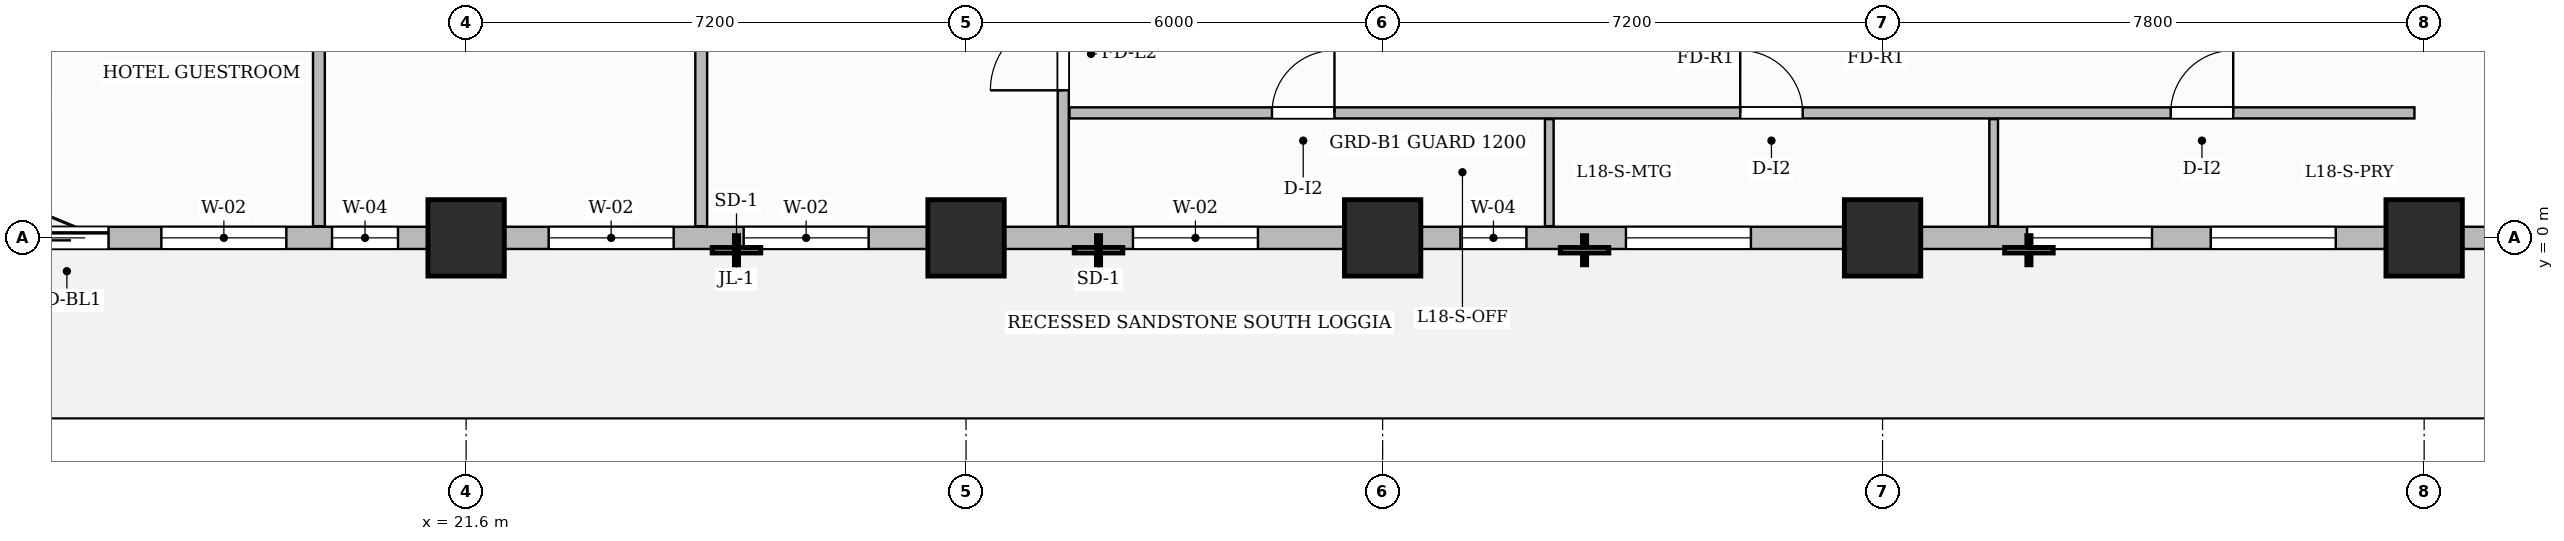
"""IFC4 building model, lengths in metres.
Left out: names, types, materials, properties, quantities, classifications, styles, units other than length and angle.
Written with IfcOpenShell. Run it as: python <this file> out.ifc"""

import sys

from ifc_helpers import new_model, si_unit, direction, frame, frame_2d, origin, origin_2d, place, context, subcontext, project, spatial, rectangle, extrude, source, transform, mapped, element, fill, save


model = new_model("IFC4")
c1 = context("Model", 3, precision=1e-05, world=origin(), true_north=direction((0.0, 1.0)))
c2 = subcontext(c1, "Body", "Model", "MODEL_VIEW")
j1 = project(units=[si_unit("LENGTHUNIT", "METRE"), si_unit("PLANEANGLEUNIT", "RADIAN")], contexts=[c1])
p1 = place(None, origin())
s1 = spatial("IfcSite", under=j1, at=p1, CompositionType="ELEMENT")
p2 = place(p1, origin())
s2 = spatial("IfcBuilding", under=s1, at=p2, CompositionType="ELEMENT")
p3 = place(p2, frame((0.0, 0.0, 76.8)))
s3 = spatial("IfcBuildingStorey", under=s2, at=p3, CompositionType="ELEMENT", Elevation=76.8)
m1 = source(origin(), c2, "Body", "SweptSolid", [
    extrude(rectangle(XDim=1.1, YDim=1.1, at=origin_2d()), origin(), (0.0, 0.0, 1.0), 3.7),
])
for number, where, z_axis, x_axis in (
    (1, (21.6, 0.0, 0.0), (0.0, 0.0, 1.0), (1.0, 0.0, 0.0)),
    (2, (28.8, 0.0, 0.0), (0.0, 0.0, 1.0), (1.0, 0.0, 0.0)),
    (3, (34.8, 0.0, 0.0), (0.0, 0.0, 1.0), (1.0, 0.0, 0.0)),
    (4, (42.0, 0.0, 0.0), (0.0, 0.0, 1.0), (1.0, 0.0, 0.0)),
    (5, (49.8, 0.0, 0.0), (0.0, 0.0, 1.0), (1.0, 0.0, 0.0)),
):
    element("IfcColumn", number, at=place(p3, frame(where, z_axis=z_axis, x_axis=x_axis)), inside=s3, PredefinedType="COLUMN", context=c2, shape_type="MappedRepresentation", body=[
        mapped(m1, transform((0.0, 0.0, 0.0), scale=1.0)),
    ])
p4 = place(p3, frame((30.2, 0.168, 0.0), z_axis=(0.0, 0.0, 1.0), x_axis=(0.0, 1.0, 0.0)))
e6 = element("IfcWall", 6, at=p4, inside=s3, PredefinedType="PARTITIONING", context=c2, shape_type="SweptSolid", body=[
    extrude(rectangle(XDim=9.092, YDim=0.16, at=frame_2d((4.546, 0.0))), origin(), (0.0, 0.0, 1.0), 3.45),
])
p5 = place(p4, frame((1.957, 0.0, 0.0)))
e7 = element("IfcOpeningElement", 7, at=p5, cuts=e6, PredefinedType="OPENING", context=c2, shape_type="SweptSolid", body=[
    extrude(rectangle(XDim=1.05, YDim=2.15, at=frame_2d((0.525, 1.075))), frame((0.0, 0.09, 0.0), z_axis=(0.0, -1.0, 0.0), x_axis=(1.0, 0.0, 0.0)), (0.0, 0.0, 1.0), 0.18),
])
p6 = place(p3, frame((30.29, 1.8, 0.0), z_axis=(0.0, 0.0, 1.0), x_axis=(1.0, 0.0, 0.0)))
e8 = element("IfcWall", 8, at=p6, inside=s3, PredefinedType="PARTITIONING", context=c2, shape_type="SweptSolid", body=[
    extrude(rectangle(XDim=19.37, YDim=0.16, at=frame_2d((9.685, 0.0))), origin(), (0.0, 0.0, 1.0), 3.45),
])
p7 = place(p6, frame((2.916, 0.0, 0.0)))
e9 = element("IfcOpeningElement", 9, at=p7, cuts=e8, PredefinedType="OPENING", context=c2, shape_type="SweptSolid", body=[
    extrude(rectangle(XDim=0.9, YDim=2.15, at=frame_2d((0.45, 1.075))), frame((0.0, 0.09, 0.0), z_axis=(0.0, -1.0, 0.0), x_axis=(1.0, 0.0, 0.0)), (0.0, 0.0, 1.0), 0.18),
])
p8 = place(p6, frame((9.66, 0.0, 0.0)))
e10 = element("IfcOpeningElement", 10, at=p8, cuts=e8, PredefinedType="OPENING", context=c2, shape_type="SweptSolid", body=[
    extrude(rectangle(XDim=0.9, YDim=2.15, at=frame_2d((0.45, 1.075))), frame((0.0, 0.09, 0.0), z_axis=(0.0, -1.0, 0.0), x_axis=(1.0, 0.0, 0.0)), (0.0, 0.0, 1.0), 0.18),
])
p9 = place(p6, frame((15.86, 0.0, 0.0)))
e11 = element("IfcOpeningElement", 11, at=p9, cuts=e8, PredefinedType="OPENING", context=c2, shape_type="SweptSolid", body=[
    extrude(rectangle(XDim=0.9, YDim=2.15, at=frame_2d((0.45, 1.075))), frame((0.0, 0.09, 0.0), z_axis=(0.0, -1.0, 0.0), x_axis=(1.0, 0.0, 0.0)), (0.0, 0.0, 1.0), 0.18),
])
for number, where, z_axis, x_axis in (
    (12, (37.2, 0.168, 0.0), (0.0, 0.0, 1.0), (0.0, 1.0, 0.0)),
    (13, (43.6, 0.168, 0.0), (0.0, 0.0, 1.0), (0.0, 1.0, 0.0)),
):
    element("IfcWall", number, at=place(p3, frame(where, z_axis=z_axis, x_axis=x_axis)), inside=s3, PredefinedType="PARTITIONING", context=c2, shape_type="SweptSolid", body=[
        extrude(rectangle(XDim=1.542, YDim=0.125, at=frame_2d((0.771, 0.0))), origin(), (0.0, 0.0, 1.0), 3.45),
    ])
p10 = place(p3, frame((19.48, 0.168, 0.0), z_axis=(0.0, 0.0, 1.0), x_axis=(0.0, 1.0, 0.0)))
e14 = element("IfcWall", 14, at=p10, inside=s3, PredefinedType="PARTITIONING", context=c2, shape_type="SweptSolid", body=[
    extrude(rectangle(XDim=9.092, YDim=0.17, at=frame_2d((4.546, 0.0))), origin(), (0.0, 0.0, 1.0), 3.45),
])
p11 = place(p3, frame((24.986, 0.168, 0.0), z_axis=(0.0, 0.0, 1.0), x_axis=(0.0, 1.0, 0.0)))
e15 = element("IfcWall", 15, at=p11, inside=s3, PredefinedType="PARTITIONING", context=c2, shape_type="SweptSolid", body=[
    extrude(rectangle(XDim=9.092, YDim=0.17, at=frame_2d((4.546, 0.0))), origin(), (0.0, 0.0, 1.0), 3.075),
])
p12 = place(p3, frame((14.4, 0.0, 0.0), z_axis=(0.0, 0.0, 1.0), x_axis=(1.0, 0.0, 0.0)))
e16 = element("IfcWall", 16, at=p12, inside=s3, PredefinedType="SOLIDWALL", context=c2, shape_type="SweptSolid", body=[
    extrude(rectangle(XDim=43.2, YDim=0.32, at=frame_2d((21.6, 0.0))), origin(), (0.0, 0.0, 1.0), 2.885),
])
p13 = place(p12, frame((0.85, 0.0, 0.0)))
e17 = element("IfcOpeningElement", 17, at=p13, cuts=e16, PredefinedType="OPENING", context=c2, shape_type="SweptSolid", body=[
    extrude(rectangle(XDim=1.2, YDim=2.2, at=frame_2d((0.6, 1.1))), frame((0.0, 0.17, 0.0), z_axis=(0.0, -1.0, 0.0), x_axis=(1.0, 0.0, 0.0)), (0.0, 0.0, 1.0), 0.34),
])
p14 = place(p12, frame((2.811, 0.0, 0.8)))
e18 = element("IfcOpeningElement", 18, at=p14, cuts=e16, PredefinedType="OPENING", context=c2, shape_type="SweptSolid", body=[
    extrude(rectangle(XDim=1.8, YDim=1.85, at=frame_2d((0.9, 0.925))), frame((0.0, 0.17, 0.0), z_axis=(0.0, -1.0, 0.0), x_axis=(1.0, 0.0, 0.0)), (0.0, 0.0, 1.0), 0.34),
])
p15 = place(p12, frame((5.269, 0.0, 0.8)))
e19 = element("IfcOpeningElement", 19, at=p15, cuts=e16, PredefinedType="OPENING", context=c2, shape_type="SweptSolid", body=[
    extrude(rectangle(XDim=0.95, YDim=1.75, at=frame_2d((0.475, 0.875))), frame((0.0, 0.17, 0.0), z_axis=(0.0, -1.0, 0.0), x_axis=(1.0, 0.0, 0.0)), (0.0, 0.0, 1.0), 0.34),
])
p16 = place(p12, frame((8.389, 0.0, 0.8)))
e20 = element("IfcOpeningElement", 20, at=p16, cuts=e16, PredefinedType="OPENING", context=c2, shape_type="SweptSolid", body=[
    extrude(rectangle(XDim=1.8, YDim=1.85, at=frame_2d((0.9, 0.925))), frame((0.0, 0.17, 0.0), z_axis=(0.0, -1.0, 0.0), x_axis=(1.0, 0.0, 0.0)), (0.0, 0.0, 1.0), 0.34),
])
p17 = place(p12, frame((11.197, 0.0, 0.8)))
e21 = element("IfcOpeningElement", 21, at=p17, cuts=e16, PredefinedType="OPENING", context=c2, shape_type="SweptSolid", body=[
    extrude(rectangle(XDim=1.8, YDim=1.85, at=frame_2d((0.9, 0.925))), frame((0.0, 0.17, 0.0), z_axis=(0.0, -1.0, 0.0), x_axis=(1.0, 0.0, 0.0)), (0.0, 0.0, 1.0), 0.34),
])
p18 = place(p12, frame((16.804, 0.0, 0.8)))
e22 = element("IfcOpeningElement", 22, at=p18, cuts=e16, PredefinedType="OPENING", context=c2, shape_type="SweptSolid", body=[
    extrude(rectangle(XDim=1.8, YDim=1.85, at=frame_2d((0.9, 0.925))), frame((0.0, 0.17, 0.0), z_axis=(0.0, -1.0, 0.0), x_axis=(1.0, 0.0, 0.0)), (0.0, 0.0, 1.0), 0.34),
])
p19 = place(p12, frame((21.521, 0.0, 0.8)))
e23 = element("IfcOpeningElement", 23, at=p19, cuts=e16, PredefinedType="OPENING", context=c2, shape_type="SweptSolid", body=[
    extrude(rectangle(XDim=0.95, YDim=1.75, at=frame_2d((0.475, 0.875))), frame((0.0, 0.17, 0.0), z_axis=(0.0, -1.0, 0.0), x_axis=(1.0, 0.0, 0.0)), (0.0, 0.0, 1.0), 0.34),
])
p20 = place(p12, frame((23.904, 0.0, 0.8)))
e24 = element("IfcOpeningElement", 24, at=p20, cuts=e16, PredefinedType="OPENING", context=c2, shape_type="SweptSolid", body=[
    extrude(rectangle(XDim=1.8, YDim=1.85, at=frame_2d((0.9, 0.925))), frame((0.0, 0.17, 0.0), z_axis=(0.0, -1.0, 0.0), x_axis=(1.0, 0.0, 0.0)), (0.0, 0.0, 1.0), 0.34),
])
p21 = place(p12, frame((29.681, 0.0, 0.8)))
e25 = element("IfcOpeningElement", 25, at=p21, cuts=e16, PredefinedType="OPENING", context=c2, shape_type="SweptSolid", body=[
    extrude(rectangle(XDim=1.8, YDim=1.85, at=frame_2d((0.9, 0.925))), frame((0.0, 0.17, 0.0), z_axis=(0.0, -1.0, 0.0), x_axis=(1.0, 0.0, 0.0)), (0.0, 0.0, 1.0), 0.34),
])
p22 = place(p12, frame((32.327, 0.0, 0.8)))
e26 = element("IfcOpeningElement", 26, at=p22, cuts=e16, PredefinedType="OPENING", context=c2, shape_type="SweptSolid", body=[
    extrude(rectangle(XDim=1.8, YDim=1.85, at=frame_2d((0.9, 0.925))), frame((0.0, 0.17, 0.0), z_axis=(0.0, -1.0, 0.0), x_axis=(1.0, 0.0, 0.0)), (0.0, 0.0, 1.0), 0.34),
])
p23 = place(p12, frame((36.875, 0.0, 0.8)))
e27 = element("IfcOpeningElement", 27, at=p23, cuts=e16, PredefinedType="OPENING", context=c2, shape_type="SweptSolid", body=[
    extrude(rectangle(XDim=1.8, YDim=1.85, at=frame_2d((0.9, 0.925))), frame((0.0, 0.17, 0.0), z_axis=(0.0, -1.0, 0.0), x_axis=(1.0, 0.0, 0.0)), (0.0, 0.0, 1.0), 0.34),
])
p24 = place(p12, frame((39.925, 0.0, 0.8)))
e28 = element("IfcOpeningElement", 28, at=p24, cuts=e16, PredefinedType="OPENING", context=c2, shape_type="SweptSolid", body=[
    extrude(rectangle(XDim=1.8, YDim=1.85, at=frame_2d((0.9, 0.925))), frame((0.0, 0.17, 0.0), z_axis=(0.0, -1.0, 0.0), x_axis=(1.0, 0.0, 0.0)), (0.0, 0.0, 1.0), 0.34),
])
m2 = source(origin(), c2, "Body", "SweptSolid", [
    extrude(rectangle(XDim=1.05, YDim=2.15, at=frame_2d((0.525, 1.075))), frame((0.0, 0.025, 0.0), z_axis=(0.0, -1.0, 0.0), x_axis=(1.0, 0.0, 0.0)), (0.0, 0.0, 1.0), 0.05),
])
p25 = place(p5, origin())
e29 = element("IfcDoor", 29, at=p25, inside=s3, OperationType="SINGLE_SWING_LEFT", PredefinedType="DOOR", context=c2, shape_type="MappedRepresentation", body=[
    mapped(m2, transform((0.0, 0.0, 0.0), scale=1.0)),
])
fill(e7, e29)
m3 = source(origin(), c2, "Body", "SweptSolid", [
    extrude(rectangle(XDim=0.9, YDim=2.15, at=frame_2d((0.45, 1.075))), frame((0.0, 0.025, 0.0), z_axis=(0.0, -1.0, 0.0), x_axis=(1.0, 0.0, 0.0)), (0.0, 0.0, 1.0), 0.05),
])
p26 = place(p7, origin())
e30 = element("IfcDoor", 30, at=p26, inside=s3, OperationType="SINGLE_SWING_RIGHT", PredefinedType="DOOR", context=c2, shape_type="MappedRepresentation", body=[
    mapped(m3, transform((0.0, 0.0, 0.0), scale=1.0)),
])
fill(e9, e30)
p27 = place(p8, origin())
e31 = element("IfcDoor", 31, at=p27, inside=s3, OperationType="SINGLE_SWING_LEFT", PredefinedType="DOOR", context=c2, shape_type="MappedRepresentation", body=[
    mapped(m3, transform((0.0, 0.0, 0.0), scale=1.0)),
])
fill(e10, e31)
p28 = place(p9, origin())
e32 = element("IfcDoor", 32, at=p28, inside=s3, OperationType="SINGLE_SWING_RIGHT", PredefinedType="DOOR", context=c2, shape_type="MappedRepresentation", body=[
    mapped(m3, transform((0.0, 0.0, 0.0), scale=1.0)),
])
fill(e11, e32)
m4 = source(origin(), c2, "Body", "SweptSolid", [
    extrude(rectangle(XDim=1.2, YDim=2.2, at=frame_2d((0.6, 1.1))), frame((0.0, 0.025, 0.0), z_axis=(0.0, -1.0, 0.0), x_axis=(1.0, 0.0, 0.0)), (0.0, 0.0, 1.0), 0.05),
])
p29 = place(p13, origin())
e33 = element("IfcDoor", 33, at=p29, inside=s3, OperationType="SLIDING_TO_LEFT", PredefinedType="DOOR", context=c2, shape_type="MappedRepresentation", body=[
    mapped(m4, transform((0.0, 0.0, 0.0), scale=1.0)),
])
fill(e17, e33)
m5 = source(origin(), c2, "Body", "SweptSolid", [
    extrude(rectangle(XDim=1.8, YDim=1.85, at=frame_2d((0.9, 0.925))), frame((0.0, 0.03, 0.0), z_axis=(0.0, -1.0, 0.0), x_axis=(1.0, 0.0, 0.0)), (0.0, 0.0, 1.0), 0.06),
])
p30 = place(p14, origin())
e34 = element("IfcWindow", 34, at=p30, inside=s3, PartitioningType="DOUBLE_PANEL_VERTICAL", PredefinedType="WINDOW", context=c2, shape_type="MappedRepresentation", body=[
    mapped(m5, transform((0.0, 0.0, 0.0), scale=1.0)),
])
fill(e18, e34)
m6 = source(origin(), c2, "Body", "SweptSolid", [
    extrude(rectangle(XDim=0.95, YDim=1.75, at=frame_2d((0.475, 0.875))), frame((0.0, 0.03, 0.0), z_axis=(0.0, -1.0, 0.0), x_axis=(1.0, 0.0, 0.0)), (0.0, 0.0, 1.0), 0.06),
])
p31 = place(p15, origin())
e35 = element("IfcWindow", 35, at=p31, inside=s3, PartitioningType="SINGLE_PANEL", PredefinedType="WINDOW", context=c2, shape_type="MappedRepresentation", body=[
    mapped(m6, transform((0.0, 0.0, 0.0), scale=1.0)),
])
fill(e19, e35)
p32 = place(p16, origin())
e36 = element("IfcWindow", 36, at=p32, inside=s3, PartitioningType="DOUBLE_PANEL_VERTICAL", PredefinedType="WINDOW", context=c2, shape_type="MappedRepresentation", body=[
    mapped(m5, transform((0.0, 0.0, 0.0), scale=1.0)),
])
fill(e20, e36)
p33 = place(p17, origin())
e37 = element("IfcWindow", 37, at=p33, inside=s3, PartitioningType="DOUBLE_PANEL_VERTICAL", PredefinedType="WINDOW", context=c2, shape_type="MappedRepresentation", body=[
    mapped(m5, transform((0.0, 0.0, 0.0), scale=1.0)),
])
fill(e21, e37)
p34 = place(p18, origin())
e38 = element("IfcWindow", 38, at=p34, inside=s3, PartitioningType="DOUBLE_PANEL_VERTICAL", PredefinedType="WINDOW", context=c2, shape_type="MappedRepresentation", body=[
    mapped(m5, transform((0.0, 0.0, 0.0), scale=1.0)),
])
fill(e22, e38)
p35 = place(p19, origin())
e39 = element("IfcWindow", 39, at=p35, inside=s3, PartitioningType="SINGLE_PANEL", PredefinedType="WINDOW", context=c2, shape_type="MappedRepresentation", body=[
    mapped(m6, transform((0.0, 0.0, 0.0), scale=1.0)),
])
fill(e23, e39)
p36 = place(p20, origin())
e40 = element("IfcWindow", 40, at=p36, inside=s3, PartitioningType="DOUBLE_PANEL_VERTICAL", PredefinedType="WINDOW", context=c2, shape_type="MappedRepresentation", body=[
    mapped(m5, transform((0.0, 0.0, 0.0), scale=1.0)),
])
fill(e24, e40)
p37 = place(p21, origin())
e41 = element("IfcWindow", 41, at=p37, inside=s3, PartitioningType="DOUBLE_PANEL_VERTICAL", PredefinedType="WINDOW", context=c2, shape_type="MappedRepresentation", body=[
    mapped(m5, transform((0.0, 0.0, 0.0), scale=1.0)),
])
fill(e25, e41)
p38 = place(p22, origin())
e42 = element("IfcWindow", 42, at=p38, inside=s3, PartitioningType="DOUBLE_PANEL_VERTICAL", PredefinedType="WINDOW", context=c2, shape_type="MappedRepresentation", body=[
    mapped(m5, transform((0.0, 0.0, 0.0), scale=1.0)),
])
fill(e26, e42)
save(model, sys.argv[1])
